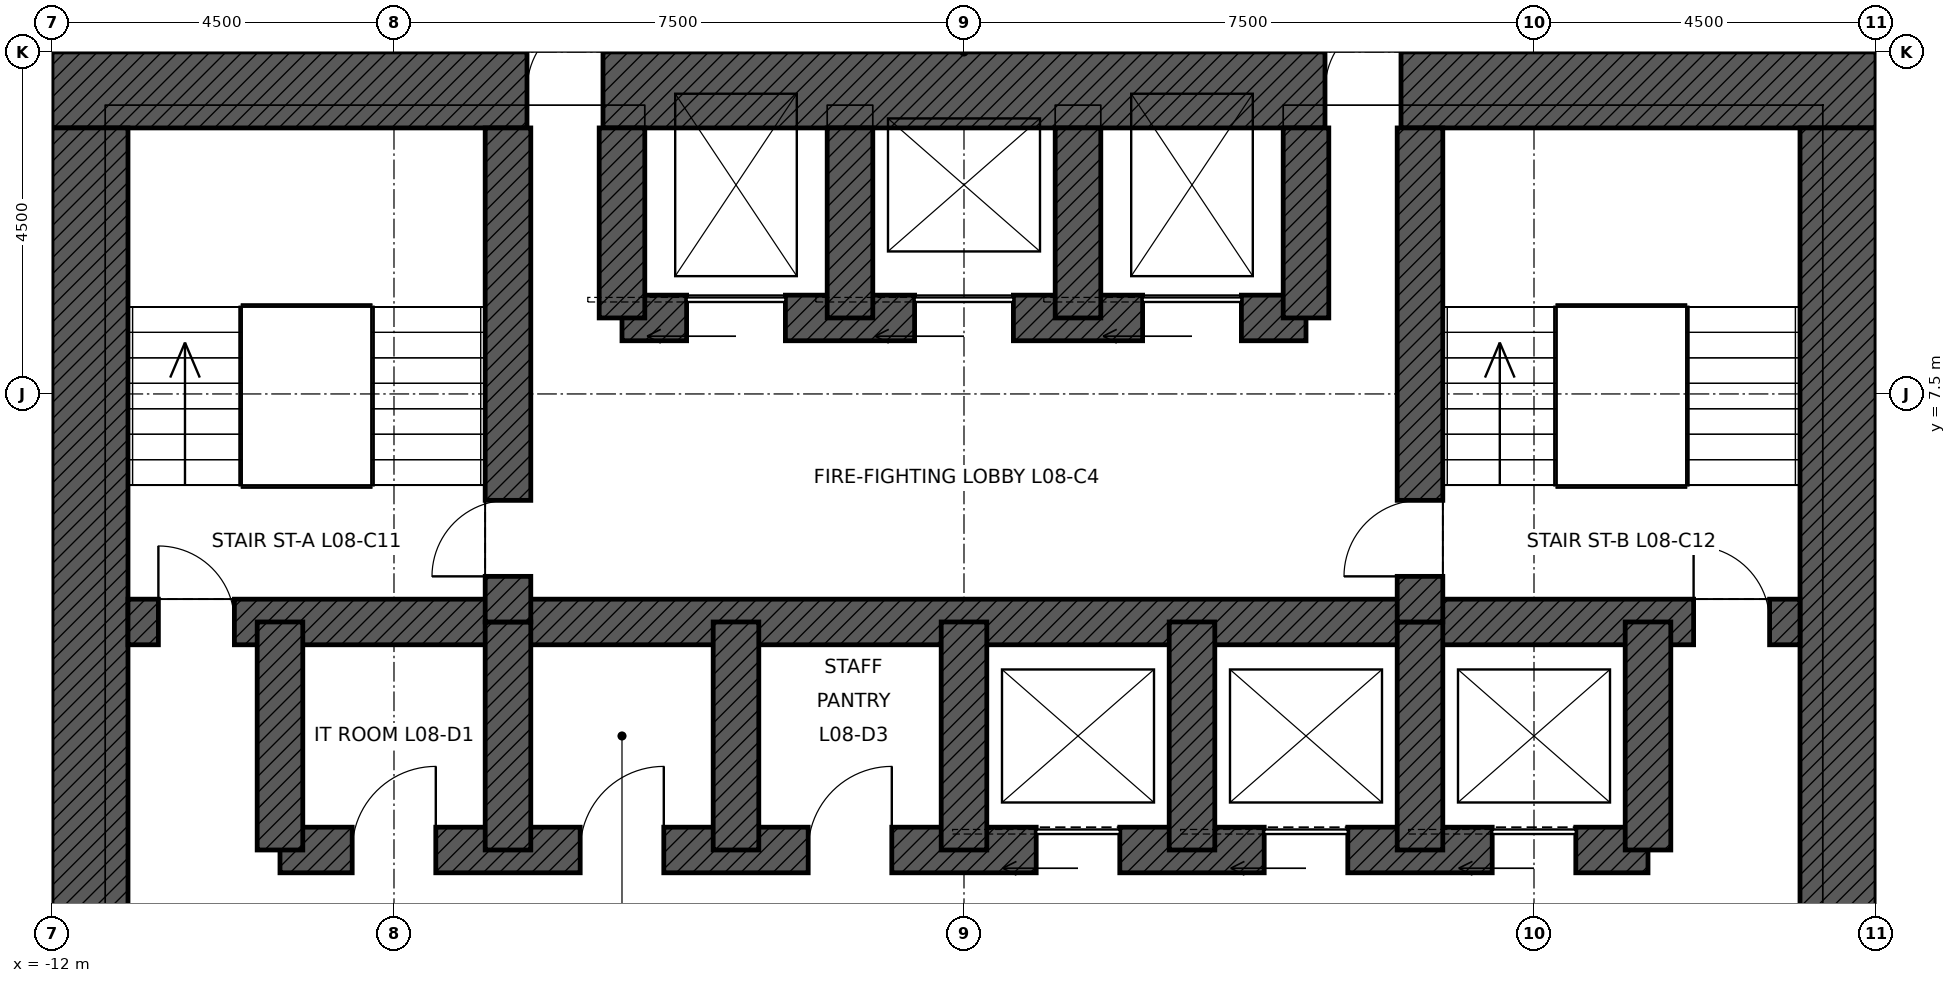
"""IFC4 building model, lengths in metres.
Left out: names, types, materials, properties, quantities, classifications, styles, units other than length and angle.
Written with IfcOpenShell. Run it as: python <this file> out.ifc"""

import sys

from ifc_helpers import new_model, si_unit, direction, frame, frame_2d, origin, place, context, subcontext, project, spatial, rectangle, extrude, element, fill, save


model = new_model("IFC4")
c1 = context("Model", 3, precision=1e-05, world=origin(), true_north=direction((0.0, 1.0)))
c2 = subcontext(c1, "Body", "Model", "MODEL_VIEW")
j1 = project(units=[si_unit("LENGTHUNIT", "METRE"), si_unit("PLANEANGLEUNIT", "RADIAN")], contexts=[c1])
p1 = place(None, origin())
s1 = spatial("IfcSite", under=j1, at=p1, CompositionType="ELEMENT")
p2 = place(p1, origin())
s2 = spatial("IfcBuilding", under=s1, at=p2, CompositionType="ELEMENT")
p3 = place(p2, frame((0.0, 0.0, 43.4)))
s3 = spatial("IfcBuildingStorey", under=s2, at=p3, CompositionType="ELEMENT", Elevation=43.4)
p4 = place(p3, frame((-12.0, 11.5, 0.0), z_axis=(0.0, 0.0, 1.0), x_axis=(1.0, 0.0, 0.0)))
e1 = element("IfcWall", 1, at=p4, inside=s3, PredefinedType="SHEAR", context=c2, shape_type="SweptSolid", body=[
    extrude(rectangle(XDim=24.0, YDim=1.0, at=frame_2d((12.0, 0.0))), origin(), (0.0, 0.0, 1.0), 5.0),
])
p5 = place(p4, frame((6.25, 0.0, 0.0)))
e2 = element("IfcOpeningElement", 2, at=p5, cuts=e1, PredefinedType="OPENING", context=c2, shape_type="SweptSolid", body=[
    extrude(rectangle(XDim=1.0, YDim=2.4, at=frame_2d((0.5, 1.2))), frame((0.0, 0.51, 0.0), z_axis=(0.0, -1.0, 0.0), x_axis=(1.0, 0.0, 0.0)), (0.0, 0.0, 1.0), 1.02),
])
p6 = place(p4, frame((16.75, 0.0, 0.0)))
e3 = element("IfcOpeningElement", 3, at=p6, cuts=e1, PredefinedType="OPENING", context=c2, shape_type="SweptSolid", body=[
    extrude(rectangle(XDim=1.0, YDim=2.4, at=frame_2d((0.5, 1.2))), frame((0.0, 0.51, 0.0), z_axis=(0.0, -1.0, 0.0), x_axis=(1.0, 0.0, 0.0)), (0.0, 0.0, 1.0), 1.02),
])
p7 = place(p3, frame((11.5, 11.0, 0.0), z_axis=(0.0, 0.0, 1.0), x_axis=(0.0, -1.0, 0.0)))
e4 = element("IfcWall", 4, at=p7, inside=s3, PredefinedType="SHEAR", context=c2, shape_type="SweptSolid", body=[
    extrude(rectangle(XDim=22.0, YDim=1.0, at=frame_2d((11.0, 0.0))), origin(), (0.0, 0.0, 1.0), 5.0),
])
p8 = place(p7, frame((10.5, 0.0, 0.0)))
e5 = element("IfcOpeningElement", 5, at=p8, cuts=e4, PredefinedType="OPENING", context=c2, shape_type="SweptSolid", body=[
    extrude(rectangle(XDim=1.0, YDim=2.4, at=frame_2d((0.5, 1.2))), frame((0.0, 0.51, 0.0), z_axis=(0.0, -1.0, 0.0), x_axis=(1.0, 0.0, 0.0)), (0.0, 0.0, 1.0), 1.02),
])
p9 = place(p3, frame((-11.5, -11.0, 0.0), z_axis=(0.0, 0.0, 1.0), x_axis=(0.0, 1.0, 0.0)))
e6 = element("IfcWall", 6, at=p9, inside=s3, PredefinedType="SHEAR", context=c2, shape_type="SweptSolid", body=[
    extrude(rectangle(XDim=22.0, YDim=1.0, at=frame_2d((11.0, 0.0))), origin(), (0.0, 0.0, 1.0), 5.0),
])
p10 = place(p9, frame((10.5, 0.0, 0.0)))
e7 = element("IfcOpeningElement", 7, at=p10, cuts=e6, PredefinedType="OPENING", context=c2, shape_type="SweptSolid", body=[
    extrude(rectangle(XDim=1.0, YDim=2.4, at=frame_2d((0.5, 1.2))), frame((0.0, 0.51, 0.0), z_axis=(0.0, -1.0, 0.0), x_axis=(1.0, 0.0, 0.0)), (0.0, 0.0, 1.0), 1.02),
])
p11 = place(p3, frame((-11.0, 4.5, 0.0), z_axis=(0.0, 0.0, 1.0), x_axis=(1.0, 0.0, 0.0)))
e8 = element("IfcWall", 8, at=p11, inside=s3, PredefinedType="SHEAR", context=c2, shape_type="SweptSolid", body=[
    extrude(rectangle(XDim=22.0, YDim=0.6, at=frame_2d((11.0, 0.0))), origin(), (0.0, 0.0, 1.0), 5.0),
])
p12 = place(p11, frame((0.4, 0.0, 0.0)))
e9 = element("IfcOpeningElement", 9, at=p12, cuts=e8, PredefinedType="OPENING", context=c2, shape_type="SweptSolid", body=[
    extrude(rectangle(XDim=1.0, YDim=2.1, at=frame_2d((0.5, 1.05))), frame((0.0, 0.31, 0.0), z_axis=(0.0, -1.0, 0.0), x_axis=(1.0, 0.0, 0.0)), (0.0, 0.0, 1.0), 0.62),
])
p13 = place(p11, frame((20.6, 0.0, 0.0)))
e10 = element("IfcOpeningElement", 10, at=p13, cuts=e8, PredefinedType="OPENING", context=c2, shape_type="SweptSolid", body=[
    extrude(rectangle(XDim=1.0, YDim=2.1, at=frame_2d((0.5, 1.05))), frame((0.0, 0.31, 0.0), z_axis=(0.0, -1.0, 0.0), x_axis=(1.0, 0.0, 0.0)), (0.0, 0.0, 1.0), 0.62),
])
p14 = place(p3, frame((-9.0, 1.5, 0.0), z_axis=(0.0, 0.0, 1.0), x_axis=(1.0, 0.0, 0.0)))
e11 = element("IfcWall", 11, at=p14, inside=s3, PredefinedType="SHEAR", context=c2, shape_type="SweptSolid", body=[
    extrude(rectangle(XDim=18.0, YDim=0.6, at=frame_2d((9.0, 0.0))), origin(), (0.0, 0.0, 1.0), 5.0),
])
p15 = place(p14, frame((9.95, 0.0, 0.0)))
e12 = element("IfcOpeningElement", 12, at=p15, cuts=e11, PredefinedType="OPENING", context=c2, shape_type="SweptSolid", body=[
    extrude(rectangle(XDim=1.1, YDim=2.1, at=frame_2d((0.55, 1.05))), frame((0.0, 0.31, 0.0), z_axis=(0.0, -1.0, 0.0), x_axis=(1.0, 0.0, 0.0)), (0.0, 0.0, 1.0), 0.62),
])
p16 = place(p14, frame((12.95, 0.0, 0.0)))
e13 = element("IfcOpeningElement", 13, at=p16, cuts=e11, PredefinedType="OPENING", context=c2, shape_type="SweptSolid", body=[
    extrude(rectangle(XDim=1.1, YDim=2.1, at=frame_2d((0.55, 1.05))), frame((0.0, 0.31, 0.0), z_axis=(0.0, -1.0, 0.0), x_axis=(1.0, 0.0, 0.0)), (0.0, 0.0, 1.0), 0.62),
])
p17 = place(p14, frame((15.95, 0.0, 0.0)))
e14 = element("IfcOpeningElement", 14, at=p17, cuts=e11, PredefinedType="OPENING", context=c2, shape_type="SweptSolid", body=[
    extrude(rectangle(XDim=1.1, YDim=2.1, at=frame_2d((0.55, 1.05))), frame((0.0, 0.31, 0.0), z_axis=(0.0, -1.0, 0.0), x_axis=(1.0, 0.0, 0.0)), (0.0, 0.0, 1.0), 0.62),
])
p18 = place(p14, frame((0.95, 0.0, 0.0)))
e15 = element("IfcOpeningElement", 15, at=p18, cuts=e11, PredefinedType="OPENING", context=c2, shape_type="SweptSolid", body=[
    extrude(rectangle(XDim=1.1, YDim=2.1, at=frame_2d((0.55, 1.05))), frame((0.0, 0.31, 0.0), z_axis=(0.0, -1.0, 0.0), x_axis=(1.0, 0.0, 0.0)), (0.0, 0.0, 1.0), 0.62),
])
p19 = place(p14, frame((3.95, 0.0, 0.0)))
e16 = element("IfcOpeningElement", 16, at=p19, cuts=e11, PredefinedType="OPENING", context=c2, shape_type="SweptSolid", body=[
    extrude(rectangle(XDim=1.1, YDim=2.1, at=frame_2d((0.55, 1.05))), frame((0.0, 0.31, 0.0), z_axis=(0.0, -1.0, 0.0), x_axis=(1.0, 0.0, 0.0)), (0.0, 0.0, 1.0), 0.62),
])
p20 = place(p14, frame((6.95, 0.0, 0.0)))
e17 = element("IfcOpeningElement", 17, at=p20, cuts=e11, PredefinedType="OPENING", context=c2, shape_type="SweptSolid", body=[
    extrude(rectangle(XDim=1.1, YDim=2.1, at=frame_2d((0.55, 1.05))), frame((0.0, 0.31, 0.0), z_axis=(0.0, -1.0, 0.0), x_axis=(1.0, 0.0, 0.0)), (0.0, 0.0, 1.0), 0.62),
])
p21 = place(p3, frame((-4.5, 8.5, 0.0), z_axis=(0.0, 0.0, 1.0), x_axis=(1.0, 0.0, 0.0)))
e18 = element("IfcWall", 18, at=p21, inside=s3, PredefinedType="SHEAR", context=c2, shape_type="SweptSolid", body=[
    extrude(rectangle(XDim=9.0, YDim=0.6, at=frame_2d((4.5, 0.0))), origin(), (0.0, 0.0, 1.0), 5.0),
])
p22 = place(p21, frame((0.85, 0.0, 0.0)))
e19 = element("IfcOpeningElement", 19, at=p22, cuts=e18, PredefinedType="OPENING", context=c2, shape_type="SweptSolid", body=[
    extrude(rectangle(XDim=1.3, YDim=2.4, at=frame_2d((0.65, 1.2))), frame((0.0, 0.31, 0.0), z_axis=(0.0, -1.0, 0.0), x_axis=(1.0, 0.0, 0.0)), (0.0, 0.0, 1.0), 0.62),
])
p23 = place(p21, frame((6.85, 0.0, 0.0)))
e20 = element("IfcOpeningElement", 20, at=p23, cuts=e18, PredefinedType="OPENING", context=c2, shape_type="SweptSolid", body=[
    extrude(rectangle(XDim=1.3, YDim=2.4, at=frame_2d((0.65, 1.2))), frame((0.0, 0.31, 0.0), z_axis=(0.0, -1.0, 0.0), x_axis=(1.0, 0.0, 0.0)), (0.0, 0.0, 1.0), 0.62),
])
p24 = place(p21, frame((3.85, 0.0, 0.0)))
e21 = element("IfcOpeningElement", 21, at=p24, cuts=e18, PredefinedType="OPENING", context=c2, shape_type="SweptSolid", body=[
    extrude(rectangle(XDim=1.3, YDim=2.4, at=frame_2d((0.65, 1.2))), frame((0.0, 0.31, 0.0), z_axis=(0.0, -1.0, 0.0), x_axis=(1.0, 0.0, 0.0)), (0.0, 0.0, 1.0), 0.62),
])
for number, where, z_axis, x_axis in (
    (22, (-9.0, 1.5, 0.0), (0.0, 0.0, 1.0), (0.0, 1.0, 0.0)),
    (23, (9.0, 1.5, 0.0), (0.0, 0.0, 1.0), (0.0, 1.0, 0.0)),
    (24, (-6.0, 1.5, 0.0), (0.0, 0.0, 1.0), (0.0, 1.0, 0.0)),
    (25, (-3.0, 1.5, 0.0), (0.0, 0.0, 1.0), (0.0, 1.0, 0.0)),
    (26, (0.0, 1.5, 0.0), (0.0, 0.0, 1.0), (0.0, 1.0, 0.0)),
    (27, (3.0, 1.5, 0.0), (0.0, 0.0, 1.0), (0.0, 1.0, 0.0)),
    (28, (6.0, 1.5, 0.0), (0.0, 0.0, 1.0), (0.0, 1.0, 0.0)),
):
    element("IfcWall", number, at=place(p3, frame(where, z_axis=z_axis, x_axis=x_axis)), inside=s3, PredefinedType="SHEAR", context=c2, shape_type="SweptSolid", body=[
        extrude(rectangle(XDim=3.0, YDim=0.6, at=frame_2d((1.5, 0.0))), origin(), (0.0, 0.0, 1.0), 5.0),
    ])
p25 = place(p3, frame((-6.0, 4.5, 0.0), z_axis=(0.0, 0.0, 1.0), x_axis=(0.0, 1.0, 0.0)))
e29 = element("IfcWall", 29, at=p25, inside=s3, PredefinedType="SHEAR", context=c2, shape_type="SweptSolid", body=[
    extrude(rectangle(XDim=6.5, YDim=0.6, at=frame_2d((3.25, 0.0))), origin(), (0.0, 0.0, 1.0), 5.0),
])
p26 = place(p25, frame((0.6, 0.0, 0.0)))
e30 = element("IfcOpeningElement", 30, at=p26, cuts=e29, PredefinedType="OPENING", context=c2, shape_type="SweptSolid", body=[
    extrude(rectangle(XDim=1.0, YDim=2.1, at=frame_2d((0.5, 1.05))), frame((0.0, 0.31, 0.0), z_axis=(0.0, -1.0, 0.0), x_axis=(1.0, 0.0, 0.0)), (0.0, 0.0, 1.0), 0.62),
])
p27 = place(p3, frame((6.0, 4.5, 0.0), z_axis=(0.0, 0.0, 1.0), x_axis=(0.0, 1.0, 0.0)))
e31 = element("IfcWall", 31, at=p27, inside=s3, PredefinedType="SHEAR", context=c2, shape_type="SweptSolid", body=[
    extrude(rectangle(XDim=6.5, YDim=0.6, at=frame_2d((3.25, 0.0))), origin(), (0.0, 0.0, 1.0), 5.0),
])
p28 = place(p27, frame((0.6, 0.0, 0.0)))
e32 = element("IfcOpeningElement", 32, at=p28, cuts=e31, PredefinedType="OPENING", context=c2, shape_type="SweptSolid", body=[
    extrude(rectangle(XDim=1.0, YDim=2.1, at=frame_2d((0.5, 1.05))), frame((0.0, 0.31, 0.0), z_axis=(0.0, -1.0, 0.0), x_axis=(1.0, 0.0, 0.0)), (0.0, 0.0, 1.0), 0.62),
])
for number, where, z_axis, x_axis in (
    (33, (-4.5, 8.5, 0.0), (0.0, 0.0, 1.0), (0.0, 1.0, 0.0)),
    (34, (4.5, 8.5, 0.0), (0.0, 0.0, 1.0), (0.0, 1.0, 0.0)),
    (35, (-1.5, 8.5, 0.0), (0.0, 0.0, 1.0), (0.0, 1.0, 0.0)),
    (36, (1.5, 8.5, 0.0), (0.0, 0.0, 1.0), (0.0, 1.0, 0.0)),
):
    element("IfcWall", number, at=place(p3, frame(where, z_axis=z_axis, x_axis=x_axis)), inside=s3, PredefinedType="SHEAR", context=c2, shape_type="SweptSolid", body=[
        extrude(rectangle(XDim=2.5, YDim=0.6, at=frame_2d((1.25, 0.0))), origin(), (0.0, 0.0, 1.0), 5.0),
    ])
p29 = place(p12, origin())
e37 = element("IfcDoor", 37, at=p29, inside=s3, OperationType="SINGLE_SWING_LEFT", PredefinedType="DOOR", context=c2, shape_type="SweptSolid", body=[
    extrude(rectangle(XDim=1.0, YDim=2.1, at=frame_2d((0.5, 1.05))), frame((0.0, 0.025, 0.0), z_axis=(0.0, -1.0, 0.0), x_axis=(1.0, 0.0, 0.0)), (0.0, 0.0, 1.0), 0.05),
])
fill(e9, e37)
p30 = place(p13, origin())
e38 = element("IfcDoor", 38, at=p30, inside=s3, OperationType="SINGLE_SWING_LEFT", PredefinedType="DOOR", context=c2, shape_type="SweptSolid", body=[
    extrude(rectangle(XDim=1.0, YDim=2.1, at=frame_2d((0.5, 1.05))), frame((0.0, 0.025, 0.0), z_axis=(0.0, -1.0, 0.0), x_axis=(1.0, 0.0, 0.0)), (0.0, 0.0, 1.0), 0.05),
])
fill(e10, e38)
p31 = place(p26, origin())
e39 = element("IfcDoor", 39, at=p31, inside=s3, OperationType="SINGLE_SWING_LEFT", PredefinedType="DOOR", context=c2, shape_type="SweptSolid", body=[
    extrude(rectangle(XDim=1.0, YDim=2.1, at=frame_2d((0.5, 1.05))), frame((0.0, 0.025, 0.0), z_axis=(0.0, -1.0, 0.0), x_axis=(1.0, 0.0, 0.0)), (0.0, 0.0, 1.0), 0.05),
])
fill(e30, e39)
p32 = place(p28, origin())
e40 = element("IfcDoor", 40, at=p32, inside=s3, OperationType="SINGLE_SWING_LEFT", PredefinedType="DOOR", context=c2, shape_type="SweptSolid", body=[
    extrude(rectangle(XDim=1.0, YDim=2.1, at=frame_2d((0.5, 1.05))), frame((0.0, 0.025, 0.0), z_axis=(0.0, -1.0, 0.0), x_axis=(1.0, 0.0, 0.0)), (0.0, 0.0, 1.0), 0.05),
])
fill(e32, e40)
p33 = place(p5, origin())
e41 = element("IfcDoor", 41, at=p33, inside=s3, OperationType="SINGLE_SWING_RIGHT", PredefinedType="DOOR", context=c2, shape_type="SweptSolid", body=[
    extrude(rectangle(XDim=1.0, YDim=2.4, at=frame_2d((0.5, 1.2))), frame((0.0, 0.485, 0.0), z_axis=(0.0, -1.0, 0.0), x_axis=(1.0, 0.0, 0.0)), (0.0, 0.0, 1.0), 0.05),
])
fill(e2, e41)
p34 = place(p6, origin())
e42 = element("IfcDoor", 42, at=p34, inside=s3, OperationType="SINGLE_SWING_RIGHT", PredefinedType="DOOR", context=c2, shape_type="SweptSolid", body=[
    extrude(rectangle(XDim=1.0, YDim=2.4, at=frame_2d((0.5, 1.2))), frame((0.0, 0.485, 0.0), z_axis=(0.0, -1.0, 0.0), x_axis=(1.0, 0.0, 0.0)), (0.0, 0.0, 1.0), 0.05),
])
fill(e3, e42)
p35 = place(p22, origin())
e43 = element("IfcDoor", 43, at=p35, inside=s3, OperationType="SLIDING_TO_LEFT", PredefinedType="DOOR", context=c2, shape_type="SweptSolid", body=[
    extrude(rectangle(XDim=1.3, YDim=2.4, at=frame_2d((0.65, 1.2))), frame((0.0, 0.025, 0.0), z_axis=(0.0, -1.0, 0.0), x_axis=(1.0, 0.0, 0.0)), (0.0, 0.0, 1.0), 0.05),
])
fill(e19, e43)
p36 = place(p23, origin())
e44 = element("IfcDoor", 44, at=p36, inside=s3, OperationType="SLIDING_TO_LEFT", PredefinedType="DOOR", context=c2, shape_type="SweptSolid", body=[
    extrude(rectangle(XDim=1.3, YDim=2.4, at=frame_2d((0.65, 1.2))), frame((0.0, 0.025, 0.0), z_axis=(0.0, -1.0, 0.0), x_axis=(1.0, 0.0, 0.0)), (0.0, 0.0, 1.0), 0.05),
])
fill(e20, e44)
p37 = place(p24, origin())
e45 = element("IfcDoor", 45, at=p37, inside=s3, OperationType="SLIDING_TO_LEFT", PredefinedType="DOOR", context=c2, shape_type="SweptSolid", body=[
    extrude(rectangle(XDim=1.3, YDim=2.4, at=frame_2d((0.65, 1.2))), frame((0.0, 0.025, 0.0), z_axis=(0.0, -1.0, 0.0), x_axis=(1.0, 0.0, 0.0)), (0.0, 0.0, 1.0), 0.05),
])
fill(e21, e45)
p38 = place(p15, origin())
e46 = element("IfcDoor", 46, at=p38, inside=s3, OperationType="SLIDING_TO_LEFT", PredefinedType="DOOR", context=c2, shape_type="SweptSolid", body=[
    extrude(rectangle(XDim=1.1, YDim=2.1, at=frame_2d((0.55, 1.05))), frame((0.0, 0.025, 0.0), z_axis=(0.0, -1.0, 0.0), x_axis=(1.0, 0.0, 0.0)), (0.0, 0.0, 1.0), 0.05),
])
fill(e12, e46)
p39 = place(p16, origin())
e47 = element("IfcDoor", 47, at=p39, inside=s3, OperationType="SLIDING_TO_LEFT", PredefinedType="DOOR", context=c2, shape_type="SweptSolid", body=[
    extrude(rectangle(XDim=1.1, YDim=2.1, at=frame_2d((0.55, 1.05))), frame((0.0, 0.025, 0.0), z_axis=(0.0, -1.0, 0.0), x_axis=(1.0, 0.0, 0.0)), (0.0, 0.0, 1.0), 0.05),
])
fill(e13, e47)
p40 = place(p17, origin())
e48 = element("IfcDoor", 48, at=p40, inside=s3, OperationType="SLIDING_TO_LEFT", PredefinedType="DOOR", context=c2, shape_type="SweptSolid", body=[
    extrude(rectangle(XDim=1.1, YDim=2.1, at=frame_2d((0.55, 1.05))), frame((0.0, 0.025, 0.0), z_axis=(0.0, -1.0, 0.0), x_axis=(1.0, 0.0, 0.0)), (0.0, 0.0, 1.0), 0.05),
])
fill(e14, e48)
p41 = place(p18, origin())
e49 = element("IfcDoor", 49, at=p41, inside=s3, OperationType="SINGLE_SWING_RIGHT", PredefinedType="DOOR", context=c2, shape_type="SweptSolid", body=[
    extrude(rectangle(XDim=1.1, YDim=2.1, at=frame_2d((0.55, 1.05))), frame((0.0, 0.025, 0.0), z_axis=(0.0, -1.0, 0.0), x_axis=(1.0, 0.0, 0.0)), (0.0, 0.0, 1.0), 0.05),
])
fill(e15, e49)
p42 = place(p19, origin())
e50 = element("IfcDoor", 50, at=p42, inside=s3, OperationType="SINGLE_SWING_RIGHT", PredefinedType="DOOR", context=c2, shape_type="SweptSolid", body=[
    extrude(rectangle(XDim=1.1, YDim=2.1, at=frame_2d((0.55, 1.05))), frame((0.0, 0.025, 0.0), z_axis=(0.0, -1.0, 0.0), x_axis=(1.0, 0.0, 0.0)), (0.0, 0.0, 1.0), 0.05),
])
fill(e16, e50)
p43 = place(p20, origin())
e51 = element("IfcDoor", 51, at=p43, inside=s3, OperationType="SINGLE_SWING_RIGHT", PredefinedType="DOOR", context=c2, shape_type="SweptSolid", body=[
    extrude(rectangle(XDim=1.1, YDim=2.1, at=frame_2d((0.55, 1.05))), frame((0.0, 0.025, 0.0), z_axis=(0.0, -1.0, 0.0), x_axis=(1.0, 0.0, 0.0)), (0.0, 0.0, 1.0), 0.05),
])
fill(e17, e51)
save(model, sys.argv[1])
